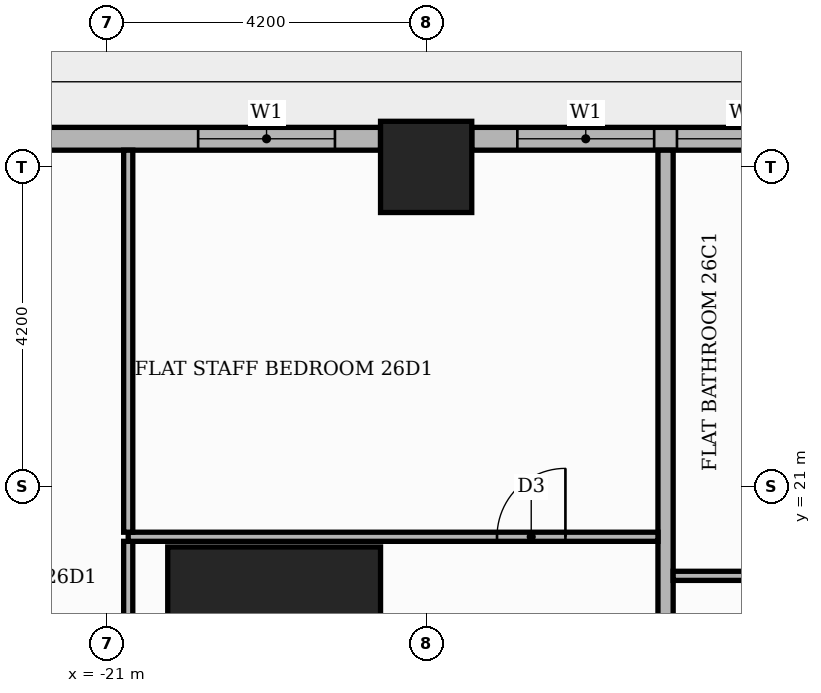
"""IFC4 building model, lengths in metres.
Left out: names, types, materials, properties, quantities, classifications, styles, units other than length and angle.
Written with IfcOpenShell. Run it as: python <this file> out.ifc"""

import sys

from ifc_helpers import new_model, si_unit, direction, frame, frame_2d, origin, origin_2d, place, context, subcontext, project, spatial, rectangle, extrude, element, fill, save


model = new_model("IFC4")
c1 = context("Model", 3, precision=1e-05, world=origin(), true_north=direction((0.0, 1.0)))
c2 = subcontext(c1, "Body", "Model", "MODEL_VIEW")
j1 = project(units=[si_unit("LENGTHUNIT", "METRE"), si_unit("PLANEANGLEUNIT", "RADIAN")], contexts=[c1])
p1 = place(None, origin())
s1 = spatial("IfcSite", under=j1, at=p1, CompositionType="ELEMENT")
p2 = place(p1, origin())
s2 = spatial("IfcBuilding", under=s1, at=p2, CompositionType="ELEMENT")
p3 = place(p2, frame((0.0, 0.0, 110.4)))
s3 = spatial("IfcBuildingStorey", under=s2, at=p3, CompositionType="ELEMENT", Elevation=110.4)
p4 = place(p3, frame((-18.8, 18.8, 0.0), z_axis=(0.0, 0.0, 1.0), x_axis=(1.0, 0.0, 0.0)))
e1 = element("IfcColumn", 1, at=p4, inside=s3, PredefinedType="COLUMN", context=c2, shape_type="SweptSolid", body=[
    extrude(rectangle(XDim=2.8, YDim=2.8, at=origin_2d()), origin(), (0.0, 0.0, 1.0), 3.9),
])
p5 = place(p3, frame((-16.8, 25.2, 0.0), z_axis=(0.0, 0.0, 1.0), x_axis=(1.0, 0.0, 0.0)))
e2 = element("IfcColumn", 2, at=p5, inside=s3, PredefinedType="COLUMN", context=c2, shape_type="SweptSolid", body=[
    extrude(rectangle(XDim=1.2, YDim=1.2, at=origin_2d()), origin(), (0.0, 0.0, 1.0), 3.9),
])
p6 = place(p3, frame((-9.0, 25.57, 0.0), z_axis=(0.0, 0.0, 1.0), x_axis=(-1.0, 0.0, 0.0)))
e3 = element("IfcWall", 3, at=p6, inside=s3, PredefinedType="STANDARD", context=c2, shape_type="SweptSolid", body=[
    extrude(rectangle(XDim=7.2, YDim=0.3, at=frame_2d((3.6, 0.0))), origin(), (0.0, 0.0, 1.0), 3.48),
])
p7 = place(p6, frame((0.6, 0.0, 0.9)))
e4 = element("IfcOpeningElement", 4, at=p7, cuts=e3, PredefinedType="OPENING", context=c2, shape_type="SweptSolid", body=[
    extrude(rectangle(XDim=1.8, YDim=2.1, at=frame_2d((0.9, 1.05))), frame((0.0, 0.16, 0.0), z_axis=(0.0, -1.0, 0.0), x_axis=(1.0, 0.0, 0.0)), (0.0, 0.0, 1.0), 0.32),
])
p8 = place(p6, frame((2.7, 0.0, 0.9)))
e5 = element("IfcOpeningElement", 5, at=p8, cuts=e3, PredefinedType="OPENING", context=c2, shape_type="SweptSolid", body=[
    extrude(rectangle(XDim=1.8, YDim=2.1, at=frame_2d((0.9, 1.05))), frame((0.0, 0.16, 0.0), z_axis=(0.0, -1.0, 0.0), x_axis=(1.0, 0.0, 0.0)), (0.0, 0.0, 1.0), 0.32),
])
p9 = place(p6, frame((4.8, 0.0, 0.9)))
e6 = element("IfcOpeningElement", 6, at=p9, cuts=e3, PredefinedType="OPENING", context=c2, shape_type="SweptSolid", body=[
    extrude(rectangle(XDim=1.8, YDim=2.1, at=frame_2d((0.9, 1.05))), frame((0.0, 0.16, 0.0), z_axis=(0.0, -1.0, 0.0), x_axis=(1.0, 0.0, 0.0)), (0.0, 0.0, 1.0), 0.32),
])
p10 = place(p3, frame((-17.4, 25.57, 0.0), z_axis=(0.0, 0.0, 1.0), x_axis=(-1.0, 0.0, 0.0)))
e7 = element("IfcWall", 7, at=p10, inside=s3, PredefinedType="STANDARD", context=c2, shape_type="SweptSolid", body=[
    extrude(rectangle(XDim=4.82, YDim=0.3, at=frame_2d((2.41, 0.0))), origin(), (0.0, 0.0, 1.0), 3.48),
])
p11 = place(p10, frame((0.6, 0.0, 0.9)))
e8 = element("IfcOpeningElement", 8, at=p11, cuts=e7, PredefinedType="OPENING", context=c2, shape_type="SweptSolid", body=[
    extrude(rectangle(XDim=1.8, YDim=2.1, at=frame_2d((0.9, 1.05))), frame((0.0, 0.16, 0.0), z_axis=(0.0, -1.0, 0.0), x_axis=(1.0, 0.0, 0.0)), (0.0, 0.0, 1.0), 0.32),
])
p12 = place(p3, frame((-13.65, 13.75, 0.0), z_axis=(0.0, 0.0, 1.0), x_axis=(0.0, 1.0, 0.0)))
e9 = element("IfcWall", 9, at=p12, inside=s3, PredefinedType="PARTITIONING", context=c2, shape_type="SweptSolid", body=[
    extrude(rectangle(XDim=11.67, YDim=0.2, at=frame_2d((5.835, 0.0))), origin(), (0.0, 0.0, 1.0), 3.48),
])
p13 = place(p3, frame((-20.72, 15.81, 0.0), z_axis=(0.0, 0.0, 1.0), x_axis=(0.0, 1.0, 0.0)))
e10 = element("IfcWall", 10, at=p13, inside=s3, PredefinedType="PARTITIONING", context=c2, shape_type="SweptSolid", body=[
    extrude(rectangle(XDim=4.464, YDim=0.12, at=frame_2d((2.232, 0.0))), origin(), (0.0, 0.0, 1.0), 3.48),
])
p14 = place(p3, frame((-13.55, 19.82, 0.0), z_axis=(0.0, 0.0, 1.0), x_axis=(1.0, 0.0, 0.0)))
e11 = element("IfcWall", 11, at=p14, inside=s3, PredefinedType="PARTITIONING", context=c2, shape_type="SweptSolid", body=[
    extrude(rectangle(XDim=30.95, YDim=0.12, at=frame_2d((15.475, 0.0))), origin(), (0.0, 0.0, 1.0), 3.48),
])
p15 = place(p14, frame((25.65, 0.0, 0.0)))
e12 = element("IfcOpeningElement", 12, at=p15, cuts=e11, PredefinedType="OPENING", context=c2, shape_type="SweptSolid", body=[
    extrude(rectangle(XDim=1.0, YDim=2.1, at=frame_2d((0.5, 1.05))), frame((0.0, 0.07, 0.0), z_axis=(0.0, -1.0, 0.0), x_axis=(1.0, 0.0, 0.0)), (0.0, 0.0, 1.0), 0.14),
])
p16 = place(p14, frame((20.4, 0.0, 0.0)))
e13 = element("IfcOpeningElement", 13, at=p16, cuts=e11, PredefinedType="OPENING", context=c2, shape_type="SweptSolid", body=[
    extrude(rectangle(XDim=1.0, YDim=2.1, at=frame_2d((0.5, 1.05))), frame((0.0, 0.07, 0.0), z_axis=(0.0, -1.0, 0.0), x_axis=(1.0, 0.0, 0.0)), (0.0, 0.0, 1.0), 0.14),
])
p17 = place(p14, frame((13.1, 0.0, 0.0)))
e14 = element("IfcOpeningElement", 14, at=p17, cuts=e11, PredefinedType="OPENING", context=c2, shape_type="SweptSolid", body=[
    extrude(rectangle(XDim=0.9, YDim=2.1, at=frame_2d((0.45, 1.05))), frame((0.0, 0.07, 0.0), z_axis=(0.0, -1.0, 0.0), x_axis=(1.0, 0.0, 0.0)), (0.0, 0.0, 1.0), 0.14),
])
p18 = place(p14, frame((3.65, 0.0, 0.0)))
e15 = element("IfcOpeningElement", 15, at=p18, cuts=e11, PredefinedType="OPENING", context=c2, shape_type="SweptSolid", body=[
    extrude(rectangle(XDim=0.9, YDim=2.1, at=frame_2d((0.45, 1.05))), frame((0.0, 0.07, 0.0), z_axis=(0.0, -1.0, 0.0), x_axis=(1.0, 0.0, 0.0)), (0.0, 0.0, 1.0), 0.14),
])
p19 = place(p3, frame((-20.72, 20.334, 0.0), z_axis=(0.0, 0.0, 1.0), x_axis=(1.0, 0.0, 0.0)))
e16 = element("IfcWall", 16, at=p19, inside=s3, PredefinedType="PARTITIONING", context=c2, shape_type="SweptSolid", body=[
    extrude(rectangle(XDim=6.97, YDim=0.12, at=frame_2d((3.485, 0.0))), origin(), (0.0, 0.0, 1.0), 3.48),
])
p20 = place(p19, frame((4.853, 0.0, 0.0)))
e17 = element("IfcOpeningElement", 17, at=p20, cuts=e16, PredefinedType="OPENING", context=c2, shape_type="SweptSolid", body=[
    extrude(rectangle(XDim=0.9, YDim=2.1, at=frame_2d((0.45, 1.05))), frame((0.0, 0.07, 0.0), z_axis=(0.0, -1.0, 0.0), x_axis=(1.0, 0.0, 0.0)), (0.0, 0.0, 1.0), 0.14),
])
p21 = place(p3, frame((-20.72, 20.394, 0.0), z_axis=(0.0, 0.0, 1.0), x_axis=(0.0, 1.0, 0.0)))
e18 = element("IfcWall", 18, at=p21, inside=s3, PredefinedType="PARTITIONING", context=c2, shape_type="SweptSolid", body=[
    extrude(rectangle(XDim=5.026, YDim=0.12, at=frame_2d((2.513, 0.0))), origin(), (0.0, 0.0, 1.0), 3.48),
])
p22 = place(p8, origin())
e19 = element("IfcWindow", 19, at=p22, inside=s3, PartitioningType="SINGLE_PANEL", PredefinedType="WINDOW", context=c2, shape_type="SweptSolid", body=[
    extrude(rectangle(XDim=1.8, YDim=2.1, at=frame_2d((0.9, 1.05))), frame((0.0, 0.03, 0.0), z_axis=(0.0, -1.0, 0.0), x_axis=(1.0, 0.0, 0.0)), (0.0, 0.0, 1.0), 0.06),
])
fill(e5, e19)
p23 = place(p9, origin())
e20 = element("IfcWindow", 20, at=p23, inside=s3, PartitioningType="SINGLE_PANEL", PredefinedType="WINDOW", context=c2, shape_type="SweptSolid", body=[
    extrude(rectangle(XDim=1.8, YDim=2.1, at=frame_2d((0.9, 1.05))), frame((0.0, 0.03, 0.0), z_axis=(0.0, -1.0, 0.0), x_axis=(1.0, 0.0, 0.0)), (0.0, 0.0, 1.0), 0.06),
])
fill(e6, e20)
p24 = place(p11, origin())
e21 = element("IfcWindow", 21, at=p24, inside=s3, PartitioningType="SINGLE_PANEL", PredefinedType="WINDOW", context=c2, shape_type="SweptSolid", body=[
    extrude(rectangle(XDim=1.8, YDim=2.1, at=frame_2d((0.9, 1.05))), frame((0.0, 0.03, 0.0), z_axis=(0.0, -1.0, 0.0), x_axis=(1.0, 0.0, 0.0)), (0.0, 0.0, 1.0), 0.06),
])
fill(e8, e21)
p25 = place(p20, origin())
e22 = element("IfcDoor", 22, at=p25, inside=s3, OperationType="SINGLE_SWING_RIGHT", PredefinedType="DOOR", context=c2, shape_type="SweptSolid", body=[
    extrude(rectangle(XDim=0.9, YDim=2.1, at=frame_2d((0.45, 1.05))), frame((0.0, 0.025, 0.0), z_axis=(0.0, -1.0, 0.0), x_axis=(1.0, 0.0, 0.0)), (0.0, 0.0, 1.0), 0.05),
])
fill(e17, e22)
save(model, sys.argv[1])
